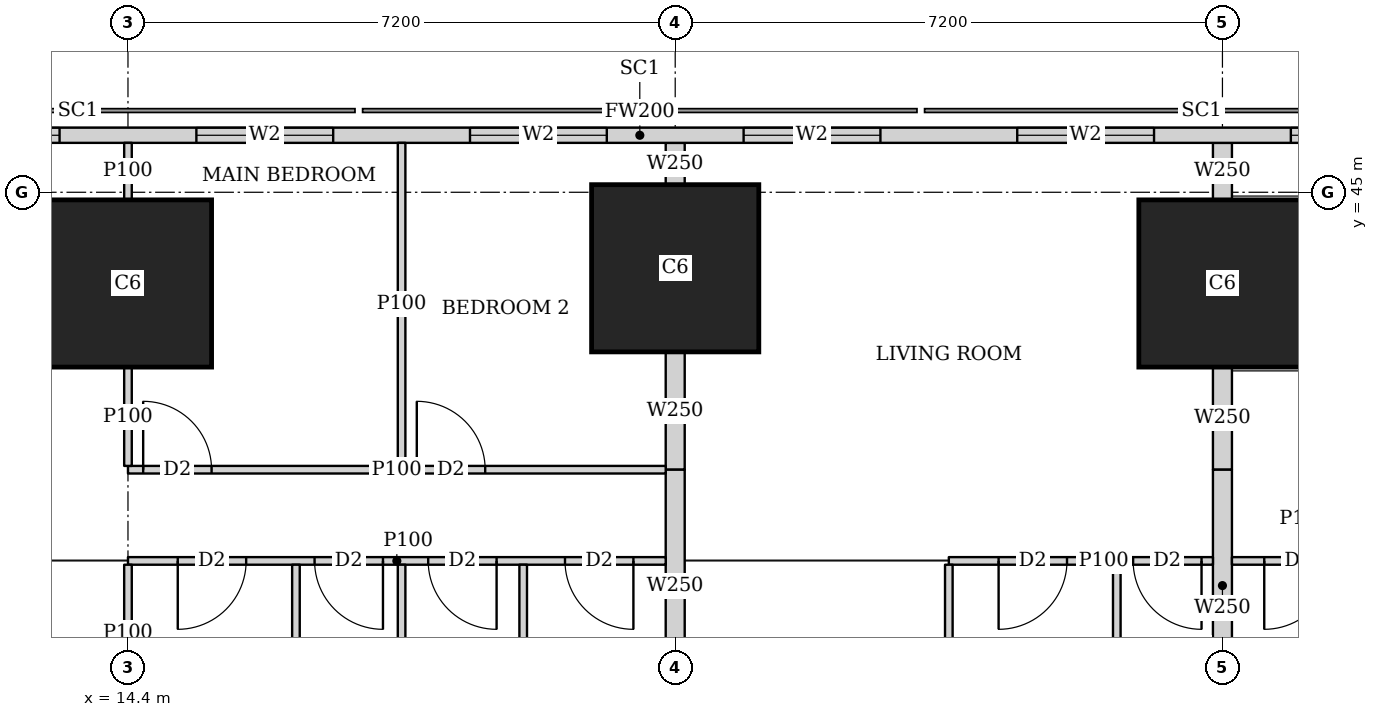
"""IFC4 building model, lengths in metres.
Left out: names, types, materials, properties, quantities, classifications, styles, units other than length and angle.
Written with IfcOpenShell. Run it as: python <this file> out.ifc"""

import sys

from ifc_helpers import new_model, si_unit, direction, frame, frame_2d, origin, origin_2d, place, context, subcontext, project, spatial, rectangle, extrude, element, fill, save


model = new_model("IFC4")
c1 = context("Model", 3, precision=1e-05, world=origin(), true_north=direction((0.0, 1.0)))
c2 = subcontext(c1, "Body", "Model", "MODEL_VIEW")
j1 = project(units=[si_unit("LENGTHUNIT", "METRE"), si_unit("PLANEANGLEUNIT", "RADIAN")], contexts=[c1])
p1 = place(None, origin())
s1 = spatial("IfcSite", under=j1, at=p1, CompositionType="ELEMENT")
p2 = place(p1, origin())
s2 = spatial("IfcBuilding", under=s1, at=p2, CompositionType="ELEMENT")
p3 = place(p2, frame((0.0, 0.0, 122.9)))
s3 = spatial("IfcBuildingStorey", under=s2, at=p3, CompositionType="ELEMENT", Elevation=122.9)
for number, where, z_axis, x_axis in (
    (1, (14.4, 43.8, 0.0), (0.0, 0.0, 1.0), (1.0, 0.0, 0.0)),
    (2, (21.6, 44.0, 0.0), (0.0, 0.0, 1.0), (1.0, 0.0, 0.0)),
    (3, (28.8, 43.8, 0.0), (0.0, 0.0, 1.0), (1.0, 0.0, 0.0)),
):
    element("IfcColumn", number, at=place(p3, frame(where, z_axis=z_axis, x_axis=x_axis)), inside=s3, PredefinedType="COLUMN", context=c2, shape_type="SweptSolid", body=[
        extrude(rectangle(XDim=2.2, YDim=2.2, at=origin_2d()), origin(), (0.0, 0.0, 1.0), 3.75),
    ])
p4 = place(p3, frame((40.106, 45.75, 0.0), z_axis=(0.0, 0.0, 1.0), x_axis=(-1.0, 0.0, 0.0)))
e4 = element("IfcWall", 4, at=p4, inside=s3, PredefinedType="SOLIDWALL", context=c2, shape_type="SweptSolid", body=[
    extrude(rectangle(XDim=37.943, YDim=0.2, at=frame_2d((18.971, 0.0))), origin(), (0.0, 0.0, 1.0), 3.5),
])
p5 = place(p4, frame((8.606, 0.0, 0.9)))
e5 = element("IfcOpeningElement", 5, at=p5, cuts=e4, PredefinedType="OPENING", context=c2, shape_type="SweptSolid", body=[
    extrude(rectangle(XDim=1.8, YDim=1.5, at=frame_2d((0.9, 0.75))), frame((0.0, 0.11, 0.0), z_axis=(0.0, -1.0, 0.0), x_axis=(1.0, 0.0, 0.0)), (0.0, 0.0, 1.0), 0.22),
])
p6 = place(p4, frame((12.206, 0.0, 0.9)))
e6 = element("IfcOpeningElement", 6, at=p6, cuts=e4, PredefinedType="OPENING", context=c2, shape_type="SweptSolid", body=[
    extrude(rectangle(XDim=1.8, YDim=1.5, at=frame_2d((0.9, 0.75))), frame((0.0, 0.11, 0.0), z_axis=(0.0, -1.0, 0.0), x_axis=(1.0, 0.0, 0.0)), (0.0, 0.0, 1.0), 0.22),
])
p7 = place(p4, frame((15.806, 0.0, 0.9)))
e7 = element("IfcOpeningElement", 7, at=p7, cuts=e4, PredefinedType="OPENING", context=c2, shape_type="SweptSolid", body=[
    extrude(rectangle(XDim=1.8, YDim=1.5, at=frame_2d((0.9, 0.75))), frame((0.0, 0.11, 0.0), z_axis=(0.0, -1.0, 0.0), x_axis=(1.0, 0.0, 0.0)), (0.0, 0.0, 1.0), 0.22),
])
p8 = place(p4, frame((19.406, 0.0, 0.9)))
e8 = element("IfcOpeningElement", 8, at=p8, cuts=e4, PredefinedType="OPENING", context=c2, shape_type="SweptSolid", body=[
    extrude(rectangle(XDim=1.8, YDim=1.5, at=frame_2d((0.9, 0.75))), frame((0.0, 0.11, 0.0), z_axis=(0.0, -1.0, 0.0), x_axis=(1.0, 0.0, 0.0)), (0.0, 0.0, 1.0), 0.22),
])
p9 = place(p4, frame((23.006, 0.0, 0.9)))
e9 = element("IfcOpeningElement", 9, at=p9, cuts=e4, PredefinedType="OPENING", context=c2, shape_type="SweptSolid", body=[
    extrude(rectangle(XDim=1.8, YDim=1.5, at=frame_2d((0.9, 0.75))), frame((0.0, 0.11, 0.0), z_axis=(0.0, -1.0, 0.0), x_axis=(1.0, 0.0, 0.0)), (0.0, 0.0, 1.0), 0.22),
])
p10 = place(p4, frame((26.606, 0.0, 0.9)))
e10 = element("IfcOpeningElement", 10, at=p10, cuts=e4, PredefinedType="OPENING", context=c2, shape_type="SweptSolid", body=[
    extrude(rectangle(XDim=1.8, YDim=1.5, at=frame_2d((0.9, 0.75))), frame((0.0, 0.11, 0.0), z_axis=(0.0, -1.0, 0.0), x_axis=(1.0, 0.0, 0.0)), (0.0, 0.0, 1.0), 0.22),
])
p11 = place(p3, frame((14.4, 41.35, 0.0), z_axis=(0.0, 0.0, 1.0), x_axis=(1.0, 0.0, 0.0)))
e11 = element("IfcWall", 11, at=p11, inside=s3, PredefinedType="PARTITIONING", context=c2, shape_type="SweptSolid", body=[
    extrude(rectangle(XDim=7.075, YDim=0.1, at=frame_2d((3.538, 0.0))), origin(), (0.0, 0.0, 1.0), 3.5),
])
p12 = place(p11, frame((0.2, 0.0, 0.0)))
e12 = element("IfcOpeningElement", 12, at=p12, cuts=e11, PredefinedType="OPENING", context=c2, shape_type="SweptSolid", body=[
    extrude(rectangle(XDim=0.9, YDim=2.1, at=frame_2d((0.45, 1.05))), frame((0.0, 0.06, 0.0), z_axis=(0.0, -1.0, 0.0), x_axis=(1.0, 0.0, 0.0)), (0.0, 0.0, 1.0), 0.12),
])
p13 = place(p11, frame((3.8, 0.0, 0.0)))
e13 = element("IfcOpeningElement", 13, at=p13, cuts=e11, PredefinedType="OPENING", context=c2, shape_type="SweptSolid", body=[
    extrude(rectangle(XDim=0.9, YDim=2.1, at=frame_2d((0.45, 1.05))), frame((0.0, 0.06, 0.0), z_axis=(0.0, -1.0, 0.0), x_axis=(1.0, 0.0, 0.0)), (0.0, 0.0, 1.0), 0.12),
])
p14 = place(p3, frame((14.4, 40.15, 0.0), z_axis=(0.0, 0.0, 1.0), x_axis=(1.0, 0.0, 0.0)))
e14 = element("IfcWall", 14, at=p14, inside=s3, PredefinedType="PARTITIONING", context=c2, shape_type="SweptSolid", body=[
    extrude(rectangle(XDim=7.075, YDim=0.1, at=frame_2d((3.538, 0.0))), origin(), (0.0, 0.0, 1.0), 3.5),
])
p15 = place(p14, frame((0.655, 0.0, 0.0)))
e15 = element("IfcOpeningElement", 15, at=p15, cuts=e14, PredefinedType="OPENING", context=c2, shape_type="SweptSolid", body=[
    extrude(rectangle(XDim=0.9, YDim=2.1, at=frame_2d((0.45, 1.05))), frame((0.0, 0.06, 0.0), z_axis=(0.0, -1.0, 0.0), x_axis=(1.0, 0.0, 0.0)), (0.0, 0.0, 1.0), 0.12),
])
p16 = place(p14, frame((3.95, 0.0, 0.0)))
e16 = element("IfcOpeningElement", 16, at=p16, cuts=e14, PredefinedType="OPENING", context=c2, shape_type="SweptSolid", body=[
    extrude(rectangle(XDim=0.9, YDim=2.1, at=frame_2d((0.45, 1.05))), frame((0.0, 0.06, 0.0), z_axis=(0.0, -1.0, 0.0), x_axis=(1.0, 0.0, 0.0)), (0.0, 0.0, 1.0), 0.12),
])
p17 = place(p14, frame((2.455, 0.0, 0.0)))
e17 = element("IfcOpeningElement", 17, at=p17, cuts=e14, PredefinedType="OPENING", context=c2, shape_type="SweptSolid", body=[
    extrude(rectangle(XDim=0.9, YDim=2.1, at=frame_2d((0.45, 1.05))), frame((0.0, 0.06, 0.0), z_axis=(0.0, -1.0, 0.0), x_axis=(1.0, 0.0, 0.0)), (0.0, 0.0, 1.0), 0.12),
])
p18 = place(p14, frame((5.75, 0.0, 0.0)))
e18 = element("IfcOpeningElement", 18, at=p18, cuts=e14, PredefinedType="OPENING", context=c2, shape_type="SweptSolid", body=[
    extrude(rectangle(XDim=0.9, YDim=2.1, at=frame_2d((0.45, 1.05))), frame((0.0, 0.06, 0.0), z_axis=(0.0, -1.0, 0.0), x_axis=(1.0, 0.0, 0.0)), (0.0, 0.0, 1.0), 0.12),
])
p19 = place(p3, frame((14.4, 41.4, 0.0), z_axis=(0.0, 0.0, 1.0), x_axis=(0.0, 1.0, 0.0)))
e19 = element("IfcWall", 19, at=p19, inside=s3, PredefinedType="PARTITIONING", context=c2, shape_type="SweptSolid", body=[
    extrude(rectangle(XDim=1.299, YDim=0.1, at=frame_2d((0.649, 0.0))), origin(), (0.0, 0.0, 1.0), 3.5),
])
p20 = place(p3, frame((14.4, 44.901, 0.0), z_axis=(0.0, 0.0, 1.0), x_axis=(0.0, 1.0, 0.0)))
e20 = element("IfcWall", 20, at=p20, inside=s3, PredefinedType="PARTITIONING", context=c2, shape_type="SweptSolid", body=[
    extrude(rectangle(XDim=0.749, YDim=0.1, at=frame_2d((0.375, 0.0))), origin(), (0.0, 0.0, 1.0), 3.5),
])
p21 = place(p3, frame((18.0, 41.4, 0.0), z_axis=(0.0, 0.0, 1.0), x_axis=(0.0, 1.0, 0.0)))
e21 = element("IfcWall", 21, at=p21, inside=s3, PredefinedType="PARTITIONING", context=c2, shape_type="SweptSolid", body=[
    extrude(rectangle(XDim=4.25, YDim=0.1, at=frame_2d((2.125, 0.0))), origin(), (0.0, 0.0, 1.0), 2.2),
])
p22 = place(p3, frame((14.4, 38.301, 0.0), z_axis=(0.0, 0.0, 1.0), x_axis=(0.0, 1.0, 0.0)))
e22 = element("IfcWall", 22, at=p22, inside=s3, PredefinedType="PARTITIONING", context=c2, shape_type="SweptSolid", body=[
    extrude(rectangle(XDim=1.799, YDim=0.1, at=frame_2d((0.899, 0.0))), origin(), (0.0, 0.0, 1.0), 3.5),
])
for number, where, z_axis, x_axis in (
    (23, (18.0, 36.825, 0.0), (0.0, 0.0, 1.0), (0.0, 1.0, 0.0)),
    (24, (16.61, 36.825, 0.0), (0.0, 0.0, 1.0), (0.0, 1.0, 0.0)),
    (25, (19.6, 36.825, 0.0), (0.0, 0.0, 1.0), (0.0, 1.0, 0.0)),
):
    element("IfcWall", number, at=place(p3, frame(where, z_axis=z_axis, x_axis=x_axis)), inside=s3, PredefinedType="PARTITIONING", context=c2, shape_type="SweptSolid", body=[
        extrude(rectangle(XDim=3.275, YDim=0.1, at=frame_2d((1.638, 0.0))), origin(), (0.0, 0.0, 1.0), 3.5),
    ])
p23 = place(p3, frame((25.2, 40.15, 0.0), z_axis=(0.0, 0.0, 1.0), x_axis=(1.0, 0.0, 0.0)))
e26 = element("IfcWall", 26, at=p23, inside=s3, PredefinedType="PARTITIONING", context=c2, shape_type="SweptSolid", body=[
    extrude(rectangle(XDim=3.475, YDim=0.1, at=frame_2d((1.738, 0.0))), origin(), (0.0, 0.0, 1.0), 3.5),
])
p24 = place(p23, frame((0.655, 0.0, 0.0)))
e27 = element("IfcOpeningElement", 27, at=p24, cuts=e26, PredefinedType="OPENING", context=c2, shape_type="SweptSolid", body=[
    extrude(rectangle(XDim=0.9, YDim=2.1, at=frame_2d((0.45, 1.05))), frame((0.0, 0.06, 0.0), z_axis=(0.0, -1.0, 0.0), x_axis=(1.0, 0.0, 0.0)), (0.0, 0.0, 1.0), 0.12),
])
p25 = place(p23, frame((2.425, 0.0, 0.0)))
e28 = element("IfcOpeningElement", 28, at=p25, cuts=e26, PredefinedType="OPENING", context=c2, shape_type="SweptSolid", body=[
    extrude(rectangle(XDim=0.9, YDim=2.1, at=frame_2d((0.45, 1.05))), frame((0.0, 0.06, 0.0), z_axis=(0.0, -1.0, 0.0), x_axis=(1.0, 0.0, 0.0)), (0.0, 0.0, 1.0), 0.12),
])
for number, where, z_axis, x_axis in (
    (29, (25.2, 36.825, 0.0), (0.0, 0.0, 1.0), (0.0, 1.0, 0.0)),
    (30, (27.41, 36.825, 0.0), (0.0, 0.0, 1.0), (0.0, 1.0, 0.0)),
):
    element("IfcWall", number, at=place(p3, frame(where, z_axis=z_axis, x_axis=x_axis)), inside=s3, PredefinedType="PARTITIONING", context=c2, shape_type="SweptSolid", body=[
        extrude(rectangle(XDim=3.275, YDim=0.1, at=frame_2d((1.638, 0.0))), origin(), (0.0, 0.0, 1.0), 3.5),
    ])
p26 = place(p3, frame((21.6, 41.35, 0.0), z_axis=(0.0, 0.0, 1.0), x_axis=(0.0, 1.0, 0.0)))
e31 = element("IfcWall", 31, at=p26, inside=s3, PredefinedType="SOLIDWALL", context=c2, shape_type="SweptSolid", body=[
    extrude(rectangle(XDim=1.549, YDim=0.25, at=frame_2d((0.774, 0.0))), origin(), (0.0, 0.0, 1.0), 3.5),
])
p27 = place(p3, frame((21.6, 45.101, 0.0), z_axis=(0.0, 0.0, 1.0), x_axis=(0.0, 1.0, 0.0)))
e32 = element("IfcWall", 32, at=p27, inside=s3, PredefinedType="SOLIDWALL", context=c2, shape_type="SweptSolid", body=[
    extrude(rectangle(XDim=0.549, YDim=0.25, at=frame_2d((0.274, 0.0))), origin(), (0.0, 0.0, 1.0), 3.5),
])
p28 = place(p3, frame((21.6, 38.301, 0.0), z_axis=(0.0, 0.0, 1.0), x_axis=(0.0, 1.0, 0.0)))
e33 = element("IfcWall", 33, at=p28, inside=s3, PredefinedType="SOLIDWALL", context=c2, shape_type="SweptSolid", body=[
    extrude(rectangle(XDim=3.049, YDim=0.25, at=frame_2d((1.524, 0.0))), origin(), (0.0, 0.0, 1.0), 3.5),
])
p29 = place(p3, frame((28.925, 40.15, 0.0), z_axis=(0.0, 0.0, 1.0), x_axis=(1.0, 0.0, 0.0)))
e34 = element("IfcWall", 34, at=p29, inside=s3, PredefinedType="PARTITIONING", context=c2, shape_type="SweptSolid", body=[
    extrude(rectangle(XDim=1.904, YDim=0.1, at=frame_2d((0.952, 0.0))), origin(), (0.0, 0.0, 1.0), 3.5),
])
p30 = place(p29, frame((0.425, 0.0, 0.0)))
e35 = element("IfcOpeningElement", 35, at=p30, cuts=e34, PredefinedType="OPENING", context=c2, shape_type="SweptSolid", body=[
    extrude(rectangle(XDim=0.9, YDim=2.1, at=frame_2d((0.45, 1.05))), frame((0.0, 0.06, 0.0), z_axis=(0.0, -1.0, 0.0), x_axis=(1.0, 0.0, 0.0)), (0.0, 0.0, 1.0), 0.12),
])
p31 = place(p3, frame((28.8, 41.35, 0.0), z_axis=(0.0, 0.0, 1.0), x_axis=(0.0, 1.0, 0.0)))
e36 = element("IfcWall", 36, at=p31, inside=s3, PredefinedType="SOLIDWALL", context=c2, shape_type="SweptSolid", body=[
    extrude(rectangle(XDim=1.349, YDim=0.25, at=frame_2d((0.674, 0.0))), origin(), (0.0, 0.0, 1.0), 3.5),
])
p32 = place(p3, frame((28.8, 44.901, 0.0), z_axis=(0.0, 0.0, 1.0), x_axis=(0.0, 1.0, 0.0)))
e37 = element("IfcWall", 37, at=p32, inside=s3, PredefinedType="SOLIDWALL", context=c2, shape_type="SweptSolid", body=[
    extrude(rectangle(XDim=0.749, YDim=0.25, at=frame_2d((0.375, 0.0))), origin(), (0.0, 0.0, 1.0), 3.5),
])
p33 = place(p3, frame((28.8, 38.301, 0.0), z_axis=(0.0, 0.0, 1.0), x_axis=(0.0, 1.0, 0.0)))
e38 = element("IfcWall", 38, at=p33, inside=s3, PredefinedType="SOLIDWALL", context=c2, shape_type="SweptSolid", body=[
    extrude(rectangle(XDim=3.049, YDim=0.25, at=frame_2d((1.524, 0.0))), origin(), (0.0, 0.0, 1.0), 3.5),
])
p34 = place(p5, origin())
e39 = element("IfcWindow", 39, at=p34, inside=s3, PartitioningType="SINGLE_PANEL", PredefinedType="WINDOW", context=c2, shape_type="SweptSolid", body=[
    extrude(rectangle(XDim=1.8, YDim=1.5, at=frame_2d((0.9, 0.75))), frame((0.0, 0.03, 0.0), z_axis=(0.0, -1.0, 0.0), x_axis=(1.0, 0.0, 0.0)), (0.0, 0.0, 1.0), 0.06),
])
fill(e5, e39)
p35 = place(p6, origin())
e40 = element("IfcWindow", 40, at=p35, inside=s3, PartitioningType="SINGLE_PANEL", PredefinedType="WINDOW", context=c2, shape_type="SweptSolid", body=[
    extrude(rectangle(XDim=1.8, YDim=1.5, at=frame_2d((0.9, 0.75))), frame((0.0, 0.03, 0.0), z_axis=(0.0, -1.0, 0.0), x_axis=(1.0, 0.0, 0.0)), (0.0, 0.0, 1.0), 0.06),
])
fill(e6, e40)
p36 = place(p7, origin())
e41 = element("IfcWindow", 41, at=p36, inside=s3, PartitioningType="SINGLE_PANEL", PredefinedType="WINDOW", context=c2, shape_type="SweptSolid", body=[
    extrude(rectangle(XDim=1.8, YDim=1.5, at=frame_2d((0.9, 0.75))), frame((0.0, 0.03, 0.0), z_axis=(0.0, -1.0, 0.0), x_axis=(1.0, 0.0, 0.0)), (0.0, 0.0, 1.0), 0.06),
])
fill(e7, e41)
p37 = place(p8, origin())
e42 = element("IfcWindow", 42, at=p37, inside=s3, PartitioningType="SINGLE_PANEL", PredefinedType="WINDOW", context=c2, shape_type="SweptSolid", body=[
    extrude(rectangle(XDim=1.8, YDim=1.5, at=frame_2d((0.9, 0.75))), frame((0.0, 0.03, 0.0), z_axis=(0.0, -1.0, 0.0), x_axis=(1.0, 0.0, 0.0)), (0.0, 0.0, 1.0), 0.06),
])
fill(e8, e42)
p38 = place(p9, origin())
e43 = element("IfcWindow", 43, at=p38, inside=s3, PartitioningType="SINGLE_PANEL", PredefinedType="WINDOW", context=c2, shape_type="SweptSolid", body=[
    extrude(rectangle(XDim=1.8, YDim=1.5, at=frame_2d((0.9, 0.75))), frame((0.0, 0.03, 0.0), z_axis=(0.0, -1.0, 0.0), x_axis=(1.0, 0.0, 0.0)), (0.0, 0.0, 1.0), 0.06),
])
fill(e9, e43)
p39 = place(p10, origin())
e44 = element("IfcWindow", 44, at=p39, inside=s3, PartitioningType="SINGLE_PANEL", PredefinedType="WINDOW", context=c2, shape_type="SweptSolid", body=[
    extrude(rectangle(XDim=1.8, YDim=1.5, at=frame_2d((0.9, 0.75))), frame((0.0, 0.03, 0.0), z_axis=(0.0, -1.0, 0.0), x_axis=(1.0, 0.0, 0.0)), (0.0, 0.0, 1.0), 0.06),
])
fill(e10, e44)
p40 = place(p12, origin())
e45 = element("IfcDoor", 45, at=p40, inside=s3, OperationType="SINGLE_SWING_LEFT", PredefinedType="DOOR", context=c2, shape_type="SweptSolid", body=[
    extrude(rectangle(XDim=0.9, YDim=2.1, at=frame_2d((0.45, 1.05))), frame((0.0, 0.025, 0.0), z_axis=(0.0, -1.0, 0.0), x_axis=(1.0, 0.0, 0.0)), (0.0, 0.0, 1.0), 0.05),
])
fill(e12, e45)
p41 = place(p13, origin())
e46 = element("IfcDoor", 46, at=p41, inside=s3, OperationType="SINGLE_SWING_LEFT", PredefinedType="DOOR", context=c2, shape_type="SweptSolid", body=[
    extrude(rectangle(XDim=0.9, YDim=2.1, at=frame_2d((0.45, 1.05))), frame((0.0, 0.025, 0.0), z_axis=(0.0, -1.0, 0.0), x_axis=(1.0, 0.0, 0.0)), (0.0, 0.0, 1.0), 0.05),
])
fill(e13, e46)
p42 = place(p15, origin())
e47 = element("IfcDoor", 47, at=p42, inside=s3, OperationType="SINGLE_SWING_RIGHT", PredefinedType="DOOR", context=c2, shape_type="SweptSolid", body=[
    extrude(rectangle(XDim=0.9, YDim=2.1, at=frame_2d((0.45, 1.05))), frame((0.0, 0.025, 0.0), z_axis=(0.0, -1.0, 0.0), x_axis=(1.0, 0.0, 0.0)), (0.0, 0.0, 1.0), 0.05),
])
fill(e15, e47)
p43 = place(p16, origin())
e48 = element("IfcDoor", 48, at=p43, inside=s3, OperationType="SINGLE_SWING_LEFT", PredefinedType="DOOR", context=c2, shape_type="SweptSolid", body=[
    extrude(rectangle(XDim=0.9, YDim=2.1, at=frame_2d((0.45, 1.05))), frame((0.0, 0.025, 0.0), z_axis=(0.0, -1.0, 0.0), x_axis=(1.0, 0.0, 0.0)), (0.0, 0.0, 1.0), 0.05),
])
fill(e16, e48)
p44 = place(p17, origin())
e49 = element("IfcDoor", 49, at=p44, inside=s3, OperationType="SINGLE_SWING_LEFT", PredefinedType="DOOR", context=c2, shape_type="SweptSolid", body=[
    extrude(rectangle(XDim=0.9, YDim=2.1, at=frame_2d((0.45, 1.05))), frame((0.0, 0.025, 0.0), z_axis=(0.0, -1.0, 0.0), x_axis=(1.0, 0.0, 0.0)), (0.0, 0.0, 1.0), 0.05),
])
fill(e17, e49)
p45 = place(p18, origin())
e50 = element("IfcDoor", 50, at=p45, inside=s3, OperationType="SINGLE_SWING_LEFT", PredefinedType="DOOR", context=c2, shape_type="SweptSolid", body=[
    extrude(rectangle(XDim=0.9, YDim=2.1, at=frame_2d((0.45, 1.05))), frame((0.0, 0.025, 0.0), z_axis=(0.0, -1.0, 0.0), x_axis=(1.0, 0.0, 0.0)), (0.0, 0.0, 1.0), 0.05),
])
fill(e18, e50)
p46 = place(p24, origin())
e51 = element("IfcDoor", 51, at=p46, inside=s3, OperationType="SINGLE_SWING_RIGHT", PredefinedType="DOOR", context=c2, shape_type="SweptSolid", body=[
    extrude(rectangle(XDim=0.9, YDim=2.1, at=frame_2d((0.45, 1.05))), frame((0.0, 0.025, 0.0), z_axis=(0.0, -1.0, 0.0), x_axis=(1.0, 0.0, 0.0)), (0.0, 0.0, 1.0), 0.05),
])
fill(e27, e51)
p47 = place(p25, origin())
e52 = element("IfcDoor", 52, at=p47, inside=s3, OperationType="SINGLE_SWING_LEFT", PredefinedType="DOOR", context=c2, shape_type="SweptSolid", body=[
    extrude(rectangle(XDim=0.9, YDim=2.1, at=frame_2d((0.45, 1.05))), frame((0.0, 0.025, 0.0), z_axis=(0.0, -1.0, 0.0), x_axis=(1.0, 0.0, 0.0)), (0.0, 0.0, 1.0), 0.05),
])
fill(e28, e52)
p48 = place(p30, origin())
e53 = element("IfcDoor", 53, at=p48, inside=s3, OperationType="SINGLE_SWING_RIGHT", PredefinedType="DOOR", context=c2, shape_type="SweptSolid", body=[
    extrude(rectangle(XDim=0.9, YDim=2.1, at=frame_2d((0.45, 1.05))), frame((0.0, 0.025, 0.0), z_axis=(0.0, -1.0, 0.0), x_axis=(1.0, 0.0, 0.0)), (0.0, 0.0, 1.0), 0.05),
])
fill(e35, e53)
save(model, sys.argv[1])
